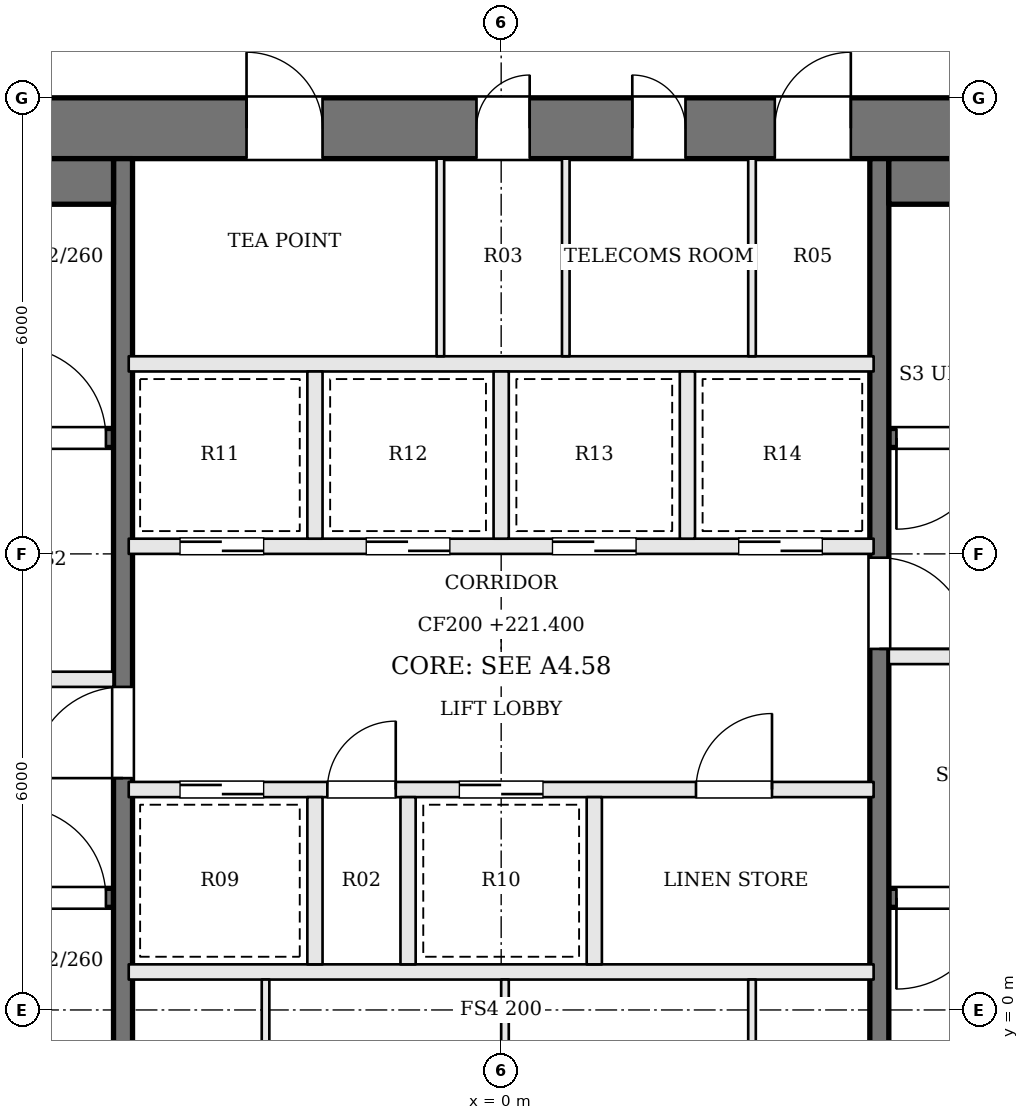
"""IFC4 building model, lengths in metres.
Left out: names, types, materials, properties, quantities, classifications, styles, units other than length and angle.
Written with IfcOpenShell. Run it as: python <this file> out.ifc"""

import sys

from ifc_helpers import new_model, si_unit, direction, frame, frame_2d, origin, place, context, subcontext, project, spatial, rectangle, extrude, element, fill, save


model = new_model("IFC4")
c1 = context("Model", 3, precision=1e-05, world=origin(), true_north=direction((0.0, 1.0)))
c2 = subcontext(c1, "Body", "Model", "MODEL_VIEW")
j1 = project(units=[si_unit("LENGTHUNIT", "METRE"), si_unit("PLANEANGLEUNIT", "RADIAN")], contexts=[c1])
p1 = place(None, origin())
s1 = spatial("IfcSite", under=j1, at=p1, CompositionType="ELEMENT")
p2 = place(p1, origin())
s2 = spatial("IfcBuilding", under=s1, at=p2, CompositionType="ELEMENT")
p3 = place(p2, frame((0.0, 0.0, 221.4)))
s3 = spatial("IfcBuildingStorey", under=s2, at=p3, CompositionType="ELEMENT", Elevation=221.4)
p4 = place(p3, frame((-13.0, 11.6, 0.0), z_axis=(0.0, 0.0, 1.0), x_axis=(1.0, 0.0, 0.0)))
e1 = element("IfcWall", 1, at=p4, inside=s3, PredefinedType="SHEAR", context=c2, shape_type="SweptSolid", body=[
    extrude(rectangle(XDim=26.0, YDim=0.8, at=frame_2d((13.0, 0.0))), origin(), (0.0, 0.0, 1.0), 3.9),
])
p5 = place(p4, frame((9.65, 0.0, 0.0)))
e2 = element("IfcOpeningElement", 2, at=p5, cuts=e1, PredefinedType="OPENING", context=c2, shape_type="SweptSolid", body=[
    extrude(rectangle(XDim=1.0, YDim=2.1, at=frame_2d((0.5, 1.05))), frame((0.0, 0.41, 0.0), z_axis=(0.0, -1.0, 0.0), x_axis=(1.0, 0.0, 0.0)), (0.0, 0.0, 1.0), 0.82),
])
p6 = place(p4, frame((12.675, 0.0, 0.0)))
e3 = element("IfcOpeningElement", 3, at=p6, cuts=e1, PredefinedType="OPENING", context=c2, shape_type="SweptSolid", body=[
    extrude(rectangle(XDim=0.7, YDim=2.1, at=frame_2d((0.35, 1.05))), frame((0.0, 0.41, 0.0), z_axis=(0.0, -1.0, 0.0), x_axis=(1.0, 0.0, 0.0)), (0.0, 0.0, 1.0), 0.82),
])
p7 = place(p4, frame((14.725, 0.0, 0.0)))
e4 = element("IfcOpeningElement", 4, at=p7, cuts=e1, PredefinedType="OPENING", context=c2, shape_type="SweptSolid", body=[
    extrude(rectangle(XDim=0.7, YDim=2.1, at=frame_2d((0.35, 1.05))), frame((0.0, 0.41, 0.0), z_axis=(0.0, -1.0, 0.0), x_axis=(1.0, 0.0, 0.0)), (0.0, 0.0, 1.0), 0.82),
])
p8 = place(p4, frame((16.6, 0.0, 0.0)))
e5 = element("IfcOpeningElement", 5, at=p8, cuts=e1, PredefinedType="OPENING", context=c2, shape_type="SweptSolid", body=[
    extrude(rectangle(XDim=1.0, YDim=2.1, at=frame_2d((0.5, 1.05))), frame((0.0, 0.41, 0.0), z_axis=(0.0, -1.0, 0.0), x_axis=(1.0, 0.0, 0.0)), (0.0, 0.0, 1.0), 0.82),
])
p9 = place(p3, frame((-12.2, 1.475, 0.0), z_axis=(0.0, 0.0, 1.0), x_axis=(1.0, 0.0, 0.0)))
e6 = element("IfcWall", 6, at=p9, inside=s3, PredefinedType="SOLIDWALL", context=c2, shape_type="SweptSolid", body=[
    extrude(rectangle(XDim=7.1, YDim=0.25, at=frame_2d((3.55, 0.0))), origin(), (0.0, 0.0, 1.0), 3.7),
])
p10 = place(p9, frame((5.8, 0.0, 0.0)))
e7 = element("IfcOpeningElement", 7, at=p10, cuts=e6, PredefinedType="OPENING", context=c2, shape_type="SweptSolid", body=[
    extrude(rectangle(XDim=1.2, YDim=2.1, at=frame_2d((0.6, 1.05))), frame((0.0, 0.135, 0.0), z_axis=(0.0, -1.0, 0.0), x_axis=(1.0, 0.0, 0.0)), (0.0, 0.0, 1.0), 0.27),
])
p11 = place(p3, frame((12.2, 7.525, 0.0), z_axis=(0.0, 0.0, 1.0), x_axis=(-1.0, 0.0, 0.0)))
e8 = element("IfcWall", 8, at=p11, inside=s3, PredefinedType="SOLIDWALL", context=c2, shape_type="SweptSolid", body=[
    extrude(rectangle(XDim=7.1, YDim=0.25, at=frame_2d((3.55, 0.0))), origin(), (0.0, 0.0, 1.0), 3.7),
])
p12 = place(p11, frame((5.8, 0.0, 0.0)))
e9 = element("IfcOpeningElement", 9, at=p12, cuts=e8, PredefinedType="OPENING", context=c2, shape_type="SweptSolid", body=[
    extrude(rectangle(XDim=1.2, YDim=2.1, at=frame_2d((0.6, 1.05))), frame((0.0, 0.135, 0.0), z_axis=(0.0, -1.0, 0.0), x_axis=(1.0, 0.0, 0.0)), (0.0, 0.0, 1.0), 0.27),
])
p13 = place(p3, frame((-12.2, 4.35, 0.0), z_axis=(0.0, 0.0, 1.0), x_axis=(1.0, 0.0, 0.0)))
e10 = element("IfcWall", 10, at=p13, inside=s3, PredefinedType="SOLIDWALL", context=c2, shape_type="SweptSolid", body=[
    extrude(rectangle(XDim=7.1, YDim=0.2, at=frame_2d((3.55, 0.0))), origin(), (0.0, 0.0, 1.0), 3.7),
])
p14 = place(p13, frame((4.4, 0.0, 0.0)))
e11 = element("IfcOpeningElement", 11, at=p14, cuts=e10, PredefinedType="OPENING", context=c2, shape_type="SweptSolid", body=[
    extrude(rectangle(XDim=1.2, YDim=2.1, at=frame_2d((0.6, 1.05))), frame((0.0, 0.11, 0.0), z_axis=(0.0, -1.0, 0.0), x_axis=(1.0, 0.0, 0.0)), (0.0, 0.0, 1.0), 0.22),
])
p15 = place(p13, frame((1.1, 0.0, 0.0)))
e12 = element("IfcOpeningElement", 12, at=p15, cuts=e10, PredefinedType="OPENING", context=c2, shape_type="SweptSolid", body=[
    extrude(rectangle(XDim=1.2, YDim=2.1, at=frame_2d((0.6, 1.05))), frame((0.0, 0.11, 0.0), z_axis=(0.0, -1.0, 0.0), x_axis=(1.0, 0.0, 0.0)), (0.0, 0.0, 1.0), 0.22),
])
p16 = place(p3, frame((12.2, 4.65, 0.0), z_axis=(0.0, 0.0, 1.0), x_axis=(-1.0, 0.0, 0.0)))
e13 = element("IfcWall", 13, at=p16, inside=s3, PredefinedType="SOLIDWALL", context=c2, shape_type="SweptSolid", body=[
    extrude(rectangle(XDim=7.1, YDim=0.2, at=frame_2d((3.55, 0.0))), origin(), (0.0, 0.0, 1.0), 3.7),
])
p17 = place(p16, frame((4.4, 0.0, 0.0)))
e14 = element("IfcOpeningElement", 14, at=p17, cuts=e13, PredefinedType="OPENING", context=c2, shape_type="SweptSolid", body=[
    extrude(rectangle(XDim=1.2, YDim=2.1, at=frame_2d((0.6, 1.05))), frame((0.0, 0.11, 0.0), z_axis=(0.0, -1.0, 0.0), x_axis=(1.0, 0.0, 0.0)), (0.0, 0.0, 1.0), 0.22),
])
p18 = place(p16, frame((1.1, 0.0, 0.0)))
e15 = element("IfcOpeningElement", 15, at=p18, cuts=e13, PredefinedType="OPENING", context=c2, shape_type="SweptSolid", body=[
    extrude(rectangle(XDim=1.2, YDim=2.1, at=frame_2d((0.6, 1.05))), frame((0.0, 0.11, 0.0), z_axis=(0.0, -1.0, 0.0), x_axis=(1.0, 0.0, 0.0)), (0.0, 0.0, 1.0), 0.22),
])
p19 = place(p3, frame((-12.2, 7.525, 0.0), z_axis=(0.0, 0.0, 1.0), x_axis=(1.0, 0.0, 0.0)))
e16 = element("IfcWall", 16, at=p19, inside=s3, PredefinedType="SOLIDWALL", context=c2, shape_type="SweptSolid", body=[
    extrude(rectangle(XDim=7.1, YDim=0.25, at=frame_2d((3.55, 0.0))), origin(), (0.0, 0.0, 1.0), 3.7),
])
p20 = place(p19, frame((5.8, 0.0, 0.0)))
e17 = element("IfcOpeningElement", 17, at=p20, cuts=e16, PredefinedType="OPENING", context=c2, shape_type="SweptSolid", body=[
    extrude(rectangle(XDim=1.2, YDim=2.1, at=frame_2d((0.6, 1.05))), frame((0.0, 0.135, 0.0), z_axis=(0.0, -1.0, 0.0), x_axis=(1.0, 0.0, 0.0)), (0.0, 0.0, 1.0), 0.27),
])
p21 = place(p3, frame((12.2, 1.475, 0.0), z_axis=(0.0, 0.0, 1.0), x_axis=(-1.0, 0.0, 0.0)))
e18 = element("IfcWall", 18, at=p21, inside=s3, PredefinedType="SOLIDWALL", context=c2, shape_type="SweptSolid", body=[
    extrude(rectangle(XDim=7.1, YDim=0.25, at=frame_2d((3.55, 0.0))), origin(), (0.0, 0.0, 1.0), 3.7),
])
p22 = place(p21, frame((5.8, 0.0, 0.0)))
e19 = element("IfcOpeningElement", 19, at=p22, cuts=e18, PredefinedType="OPENING", context=c2, shape_type="SweptSolid", body=[
    extrude(rectangle(XDim=1.2, YDim=2.1, at=frame_2d((0.6, 1.05))), frame((0.0, 0.135, 0.0), z_axis=(0.0, -1.0, 0.0), x_axis=(1.0, 0.0, 0.0)), (0.0, 0.0, 1.0), 0.27),
])
p23 = place(p3, frame((-4.975, -2.2, 0.0), z_axis=(0.0, 0.0, 1.0), x_axis=(0.0, 1.0, 0.0)))
e20 = element("IfcWall", 20, at=p23, inside=s3, PredefinedType="SOLIDWALL", context=c2, shape_type="SweptSolid", body=[
    extrude(rectangle(XDim=13.4, YDim=0.25, at=frame_2d((6.7, 0.0))), origin(), (0.0, 0.0, 1.0), 3.7),
])
p24 = place(p23, frame((5.25, 0.0, 0.0)))
e21 = element("IfcOpeningElement", 21, at=p24, cuts=e20, PredefinedType="OPENING", context=c2, shape_type="SweptSolid", body=[
    extrude(rectangle(XDim=1.2, YDim=2.1, at=frame_2d((0.6, 1.05))), frame((0.0, 0.135, 0.0), z_axis=(0.0, -1.0, 0.0), x_axis=(1.0, 0.0, 0.0)), (0.0, 0.0, 1.0), 0.27),
])
p25 = place(p3, frame((4.975, 11.2, 0.0), z_axis=(0.0, 0.0, 1.0), x_axis=(0.0, -1.0, 0.0)))
e22 = element("IfcWall", 22, at=p25, inside=s3, PredefinedType="SOLIDWALL", context=c2, shape_type="SweptSolid", body=[
    extrude(rectangle(XDim=13.4, YDim=0.25, at=frame_2d((6.7, 0.0))), origin(), (0.0, 0.0, 1.0), 3.7),
])
p26 = place(p25, frame((5.25, 0.0, 0.0)))
e23 = element("IfcOpeningElement", 23, at=p26, cuts=e22, PredefinedType="OPENING", context=c2, shape_type="SweptSolid", body=[
    extrude(rectangle(XDim=1.2, YDim=2.1, at=frame_2d((0.6, 1.05))), frame((0.0, 0.135, 0.0), z_axis=(0.0, -1.0, 0.0), x_axis=(1.0, 0.0, 0.0)), (0.0, 0.0, 1.0), 0.27),
])
for number, where, z_axis, x_axis in (
    (24, (-12.2, 10.9, 0.0), (0.0, 0.0, 1.0), (1.0, 0.0, 0.0)),
    (25, (12.2, 10.9, 0.0), (0.0, 0.0, 1.0), (-1.0, 0.0, 0.0)),
):
    element("IfcWall", number, at=place(p3, frame(where, z_axis=z_axis, x_axis=x_axis)), inside=s3, PredefinedType="SOLIDWALL", context=c2, shape_type="SweptSolid", body=[
        extrude(rectangle(XDim=7.1, YDim=0.6, at=frame_2d((3.55, 0.0))), origin(), (0.0, 0.0, 1.0), 3.7),
    ])
p27 = place(p3, frame((-4.9, 0.5, 0.0), z_axis=(0.0, 0.0, 1.0), x_axis=(1.0, 0.0, 0.0)))
e26 = element("IfcWall", 26, at=p27, inside=s3, PredefinedType="SOLIDWALL", context=c2, shape_type="SweptSolid", body=[
    extrude(rectangle(XDim=9.8, YDim=0.2, at=frame_2d((4.9, 0.0))), origin(), (0.0, 0.0, 1.0), 3.7),
])
p28 = place(p3, frame((-4.9, 2.9, 0.0), z_axis=(0.0, 0.0, 1.0), x_axis=(1.0, 0.0, 0.0)))
e27 = element("IfcWall", 27, at=p28, inside=s3, PredefinedType="SOLIDWALL", context=c2, shape_type="SweptSolid", body=[
    extrude(rectangle(XDim=9.8, YDim=0.2, at=frame_2d((4.9, 0.0))), origin(), (0.0, 0.0, 1.0), 3.7),
])
p29 = place(p28, frame((0.675, 0.0, 0.0)))
e28 = element("IfcOpeningElement", 28, at=p29, cuts=e27, PredefinedType="OPENING", context=c2, shape_type="SweptSolid", body=[
    extrude(rectangle(XDim=1.1, YDim=2.1, at=frame_2d((0.55, 1.05))), frame((0.0, 0.11, 0.0), z_axis=(0.0, -1.0, 0.0), x_axis=(1.0, 0.0, 0.0)), (0.0, 0.0, 1.0), 0.22),
])
p30 = place(p28, frame((2.613, 0.0, 0.0)))
e29 = element("IfcOpeningElement", 29, at=p30, cuts=e27, PredefinedType="OPENING", context=c2, shape_type="SweptSolid", body=[
    extrude(rectangle(XDim=0.9, YDim=2.1, at=frame_2d((0.45, 1.05))), frame((0.0, 0.11, 0.0), z_axis=(0.0, -1.0, 0.0), x_axis=(1.0, 0.0, 0.0)), (0.0, 0.0, 1.0), 0.22),
])
p31 = place(p28, frame((4.35, 0.0, 0.0)))
e30 = element("IfcOpeningElement", 30, at=p31, cuts=e27, PredefinedType="OPENING", context=c2, shape_type="SweptSolid", body=[
    extrude(rectangle(XDim=1.1, YDim=2.1, at=frame_2d((0.55, 1.05))), frame((0.0, 0.11, 0.0), z_axis=(0.0, -1.0, 0.0), x_axis=(1.0, 0.0, 0.0)), (0.0, 0.0, 1.0), 0.22),
])
p32 = place(p28, frame((7.463, 0.0, 0.0)))
e31 = element("IfcOpeningElement", 31, at=p32, cuts=e27, PredefinedType="OPENING", context=c2, shape_type="SweptSolid", body=[
    extrude(rectangle(XDim=1.0, YDim=2.1, at=frame_2d((0.5, 1.05))), frame((0.0, 0.11, 0.0), z_axis=(0.0, -1.0, 0.0), x_axis=(1.0, 0.0, 0.0)), (0.0, 0.0, 1.0), 0.22),
])
p33 = place(p3, frame((-4.9, 6.1, 0.0), z_axis=(0.0, 0.0, 1.0), x_axis=(1.0, 0.0, 0.0)))
e32 = element("IfcWall", 32, at=p33, inside=s3, PredefinedType="SOLIDWALL", context=c2, shape_type="SweptSolid", body=[
    extrude(rectangle(XDim=9.8, YDim=0.2, at=frame_2d((4.9, 0.0))), origin(), (0.0, 0.0, 1.0), 3.7),
])
p34 = place(p33, frame((0.675, 0.0, 0.0)))
e33 = element("IfcOpeningElement", 33, at=p34, cuts=e32, PredefinedType="OPENING", context=c2, shape_type="SweptSolid", body=[
    extrude(rectangle(XDim=1.1, YDim=2.1, at=frame_2d((0.55, 1.05))), frame((0.0, 0.11, 0.0), z_axis=(0.0, -1.0, 0.0), x_axis=(1.0, 0.0, 0.0)), (0.0, 0.0, 1.0), 0.22),
])
p35 = place(p33, frame((3.125, 0.0, 0.0)))
e34 = element("IfcOpeningElement", 34, at=p35, cuts=e32, PredefinedType="OPENING", context=c2, shape_type="SweptSolid", body=[
    extrude(rectangle(XDim=1.1, YDim=2.1, at=frame_2d((0.55, 1.05))), frame((0.0, 0.11, 0.0), z_axis=(0.0, -1.0, 0.0), x_axis=(1.0, 0.0, 0.0)), (0.0, 0.0, 1.0), 0.22),
])
p36 = place(p33, frame((5.575, 0.0, 0.0)))
e35 = element("IfcOpeningElement", 35, at=p36, cuts=e32, PredefinedType="OPENING", context=c2, shape_type="SweptSolid", body=[
    extrude(rectangle(XDim=1.1, YDim=2.1, at=frame_2d((0.55, 1.05))), frame((0.0, 0.11, 0.0), z_axis=(0.0, -1.0, 0.0), x_axis=(1.0, 0.0, 0.0)), (0.0, 0.0, 1.0), 0.22),
])
p37 = place(p33, frame((8.025, 0.0, 0.0)))
e36 = element("IfcOpeningElement", 36, at=p37, cuts=e32, PredefinedType="OPENING", context=c2, shape_type="SweptSolid", body=[
    extrude(rectangle(XDim=1.1, YDim=2.1, at=frame_2d((0.55, 1.05))), frame((0.0, 0.11, 0.0), z_axis=(0.0, -1.0, 0.0), x_axis=(1.0, 0.0, 0.0)), (0.0, 0.0, 1.0), 0.22),
])
p38 = place(p3, frame((-4.9, 8.5, 0.0), z_axis=(0.0, 0.0, 1.0), x_axis=(1.0, 0.0, 0.0)))
e37 = element("IfcWall", 37, at=p38, inside=s3, PredefinedType="SOLIDWALL", context=c2, shape_type="SweptSolid", body=[
    extrude(rectangle(XDim=9.8, YDim=0.2, at=frame_2d((4.9, 0.0))), origin(), (0.0, 0.0, 1.0), 3.7),
])
for number, where, z_axis, x_axis in (
    (38, (-2.45, 0.6, 0.0), (0.0, 0.0, 1.0), (0.0, 1.0, 0.0)),
    (39, (-1.225, 0.6, 0.0), (0.0, 0.0, 1.0), (0.0, 1.0, 0.0)),
    (40, (1.225, 0.6, 0.0), (0.0, 0.0, 1.0), (0.0, 1.0, 0.0)),
    (41, (-2.45, 6.2, 0.0), (0.0, 0.0, 1.0), (0.0, 1.0, 0.0)),
    (42, (0.0, 6.2, 0.0), (0.0, 0.0, 1.0), (0.0, 1.0, 0.0)),
    (43, (2.45, 6.2, 0.0), (0.0, 0.0, 1.0), (0.0, 1.0, 0.0)),
):
    element("IfcWall", number, at=place(p3, frame(where, z_axis=z_axis, x_axis=x_axis)), inside=s3, PredefinedType="SOLIDWALL", context=c2, shape_type="SweptSolid", body=[
        extrude(rectangle(XDim=2.2, YDim=0.2, at=frame_2d((1.1, 0.0))), origin(), (0.0, 0.0, 1.0), 3.7),
    ])
for number, where, z_axis, x_axis in (
    (44, (-3.1, -2.2, 0.0), (0.0, 0.0, 1.0), (0.0, 1.0, 0.0)),
    (45, (0.05, -2.2, 0.0), (0.0, 0.0, 1.0), (0.0, 1.0, 0.0)),
    (46, (3.3, -2.2, 0.0), (0.0, 0.0, 1.0), (0.0, 1.0, 0.0)),
    (47, (-0.8, 8.6, 0.0), (0.0, 0.0, 1.0), (0.0, 1.0, 0.0)),
    (48, (0.85, 8.6, 0.0), (0.0, 0.0, 1.0), (0.0, 1.0, 0.0)),
    (49, (3.3, 8.6, 0.0), (0.0, 0.0, 1.0), (0.0, 1.0, 0.0)),
):
    element("IfcWall", number, at=place(p3, frame(where, z_axis=z_axis, x_axis=x_axis)), inside=s3, PredefinedType="PARTITIONING", context=c2, shape_type="SweptSolid", body=[
        extrude(rectangle(XDim=2.6, YDim=0.1, at=frame_2d((1.3, 0.0))), origin(), (0.0, 0.0, 1.0), 3.7),
    ])
p39 = place(p24, origin())
e50 = element("IfcDoor", 50, at=p39, inside=s3, OperationType="SINGLE_SWING_LEFT", PredefinedType="DOOR", context=c2, shape_type="SweptSolid", body=[
    extrude(rectangle(XDim=1.2, YDim=2.1, at=frame_2d((0.6, 1.05))), frame((0.0, 0.025, 0.0), z_axis=(0.0, -1.0, 0.0), x_axis=(1.0, 0.0, 0.0)), (0.0, 0.0, 1.0), 0.05),
])
fill(e21, e50)
p40 = place(p26, origin())
e51 = element("IfcDoor", 51, at=p40, inside=s3, OperationType="SINGLE_SWING_RIGHT", PredefinedType="DOOR", context=c2, shape_type="SweptSolid", body=[
    extrude(rectangle(XDim=1.2, YDim=2.1, at=frame_2d((0.6, 1.05))), frame((0.0, 0.025, 0.0), z_axis=(0.0, -1.0, 0.0), x_axis=(1.0, 0.0, 0.0)), (0.0, 0.0, 1.0), 0.05),
])
fill(e23, e51)
p41 = place(p10, origin())
e52 = element("IfcDoor", 52, at=p41, inside=s3, OperationType="SINGLE_SWING_LEFT", PredefinedType="DOOR", context=c2, shape_type="SweptSolid", body=[
    extrude(rectangle(XDim=1.2, YDim=2.1, at=frame_2d((0.6, 1.05))), frame((0.0, 0.025, 0.0), z_axis=(0.0, -1.0, 0.0), x_axis=(1.0, 0.0, 0.0)), (0.0, 0.0, 1.0), 0.05),
])
fill(e7, e52)
p42 = place(p12, origin())
e53 = element("IfcDoor", 53, at=p42, inside=s3, OperationType="SINGLE_SWING_RIGHT", PredefinedType="DOOR", context=c2, shape_type="SweptSolid", body=[
    extrude(rectangle(XDim=1.2, YDim=2.1, at=frame_2d((0.6, 1.05))), frame((0.0, 0.025, 0.0), z_axis=(0.0, -1.0, 0.0), x_axis=(1.0, 0.0, 0.0)), (0.0, 0.0, 1.0), 0.05),
])
fill(e9, e53)
p43 = place(p20, origin())
e54 = element("IfcDoor", 54, at=p43, inside=s3, OperationType="SINGLE_SWING_LEFT", PredefinedType="DOOR", context=c2, shape_type="SweptSolid", body=[
    extrude(rectangle(XDim=1.2, YDim=2.1, at=frame_2d((0.6, 1.05))), frame((0.0, 0.025, 0.0), z_axis=(0.0, -1.0, 0.0), x_axis=(1.0, 0.0, 0.0)), (0.0, 0.0, 1.0), 0.05),
])
fill(e17, e54)
p44 = place(p22, origin())
e55 = element("IfcDoor", 55, at=p44, inside=s3, OperationType="SINGLE_SWING_RIGHT", PredefinedType="DOOR", context=c2, shape_type="SweptSolid", body=[
    extrude(rectangle(XDim=1.2, YDim=2.1, at=frame_2d((0.6, 1.05))), frame((0.0, 0.025, 0.0), z_axis=(0.0, -1.0, 0.0), x_axis=(1.0, 0.0, 0.0)), (0.0, 0.0, 1.0), 0.05),
])
fill(e19, e55)
p45 = place(p29, origin())
e56 = element("IfcDoor", 56, at=p45, inside=s3, OperationType="SLIDING_TO_RIGHT", PredefinedType="DOOR", context=c2, shape_type="SweptSolid", body=[
    extrude(rectangle(XDim=1.1, YDim=2.1, at=frame_2d((0.55, 1.05))), frame((0.0, 0.025, 0.0), z_axis=(0.0, -1.0, 0.0), x_axis=(1.0, 0.0, 0.0)), (0.0, 0.0, 1.0), 0.05),
])
fill(e28, e56)
p46 = place(p30, origin())
e57 = element("IfcDoor", 57, at=p46, inside=s3, OperationType="SINGLE_SWING_RIGHT", PredefinedType="DOOR", context=c2, shape_type="SweptSolid", body=[
    extrude(rectangle(XDim=0.9, YDim=2.1, at=frame_2d((0.45, 1.05))), frame((0.0, 0.025, 0.0), z_axis=(0.0, -1.0, 0.0), x_axis=(1.0, 0.0, 0.0)), (0.0, 0.0, 1.0), 0.05),
])
fill(e29, e57)
p47 = place(p31, origin())
e58 = element("IfcDoor", 58, at=p47, inside=s3, OperationType="SLIDING_TO_LEFT", PredefinedType="DOOR", context=c2, shape_type="SweptSolid", body=[
    extrude(rectangle(XDim=1.1, YDim=2.1, at=frame_2d((0.55, 1.05))), frame((0.0, 0.025, 0.0), z_axis=(0.0, -1.0, 0.0), x_axis=(1.0, 0.0, 0.0)), (0.0, 0.0, 1.0), 0.05),
])
fill(e30, e58)
p48 = place(p32, origin())
e59 = element("IfcDoor", 59, at=p48, inside=s3, OperationType="SINGLE_SWING_RIGHT", PredefinedType="DOOR", context=c2, shape_type="SweptSolid", body=[
    extrude(rectangle(XDim=1.0, YDim=2.1, at=frame_2d((0.5, 1.05))), frame((0.0, 0.025, 0.0), z_axis=(0.0, -1.0, 0.0), x_axis=(1.0, 0.0, 0.0)), (0.0, 0.0, 1.0), 0.05),
])
fill(e31, e59)
p49 = place(p34, origin())
e60 = element("IfcDoor", 60, at=p49, inside=s3, OperationType="SLIDING_TO_RIGHT", PredefinedType="DOOR", context=c2, shape_type="SweptSolid", body=[
    extrude(rectangle(XDim=1.1, YDim=2.1, at=frame_2d((0.55, 1.05))), frame((0.0, 0.025, 0.0), z_axis=(0.0, -1.0, 0.0), x_axis=(1.0, 0.0, 0.0)), (0.0, 0.0, 1.0), 0.05),
])
fill(e33, e60)
p50 = place(p35, origin())
e61 = element("IfcDoor", 61, at=p50, inside=s3, OperationType="SLIDING_TO_LEFT", PredefinedType="DOOR", context=c2, shape_type="SweptSolid", body=[
    extrude(rectangle(XDim=1.1, YDim=2.1, at=frame_2d((0.55, 1.05))), frame((0.0, 0.025, 0.0), z_axis=(0.0, -1.0, 0.0), x_axis=(1.0, 0.0, 0.0)), (0.0, 0.0, 1.0), 0.05),
])
fill(e34, e61)
p51 = place(p36, origin())
e62 = element("IfcDoor", 62, at=p51, inside=s3, OperationType="SLIDING_TO_RIGHT", PredefinedType="DOOR", context=c2, shape_type="SweptSolid", body=[
    extrude(rectangle(XDim=1.1, YDim=2.1, at=frame_2d((0.55, 1.05))), frame((0.0, 0.025, 0.0), z_axis=(0.0, -1.0, 0.0), x_axis=(1.0, 0.0, 0.0)), (0.0, 0.0, 1.0), 0.05),
])
fill(e35, e62)
p52 = place(p37, origin())
e63 = element("IfcDoor", 63, at=p52, inside=s3, OperationType="SLIDING_TO_LEFT", PredefinedType="DOOR", context=c2, shape_type="SweptSolid", body=[
    extrude(rectangle(XDim=1.1, YDim=2.1, at=frame_2d((0.55, 1.05))), frame((0.0, 0.025, 0.0), z_axis=(0.0, -1.0, 0.0), x_axis=(1.0, 0.0, 0.0)), (0.0, 0.0, 1.0), 0.05),
])
fill(e36, e63)
p53 = place(p5, origin())
e64 = element("IfcDoor", 64, at=p53, inside=s3, OperationType="SINGLE_SWING_LEFT", PredefinedType="DOOR", context=c2, shape_type="SweptSolid", body=[
    extrude(rectangle(XDim=1.0, YDim=2.1, at=frame_2d((0.5, 1.05))), frame((0.0, 0.025, 0.0), z_axis=(0.0, -1.0, 0.0), x_axis=(1.0, 0.0, 0.0)), (0.0, 0.0, 1.0), 0.05),
])
fill(e2, e64)
p54 = place(p6, origin())
e65 = element("IfcDoor", 65, at=p54, inside=s3, OperationType="SINGLE_SWING_RIGHT", PredefinedType="DOOR", context=c2, shape_type="SweptSolid", body=[
    extrude(rectangle(XDim=0.7, YDim=2.1, at=frame_2d((0.35, 1.05))), frame((0.0, 0.025, 0.0), z_axis=(0.0, -1.0, 0.0), x_axis=(1.0, 0.0, 0.0)), (0.0, 0.0, 1.0), 0.05),
])
fill(e3, e65)
p55 = place(p7, origin())
e66 = element("IfcDoor", 66, at=p55, inside=s3, OperationType="SINGLE_SWING_LEFT", PredefinedType="DOOR", context=c2, shape_type="SweptSolid", body=[
    extrude(rectangle(XDim=0.7, YDim=2.1, at=frame_2d((0.35, 1.05))), frame((0.0, 0.025, 0.0), z_axis=(0.0, -1.0, 0.0), x_axis=(1.0, 0.0, 0.0)), (0.0, 0.0, 1.0), 0.05),
])
fill(e4, e66)
p56 = place(p8, origin())
e67 = element("IfcDoor", 67, at=p56, inside=s3, OperationType="SINGLE_SWING_RIGHT", PredefinedType="DOOR", context=c2, shape_type="SweptSolid", body=[
    extrude(rectangle(XDim=1.0, YDim=2.1, at=frame_2d((0.5, 1.05))), frame((0.0, 0.025, 0.0), z_axis=(0.0, -1.0, 0.0), x_axis=(1.0, 0.0, 0.0)), (0.0, 0.0, 1.0), 0.05),
])
fill(e5, e67)
save(model, sys.argv[1])
